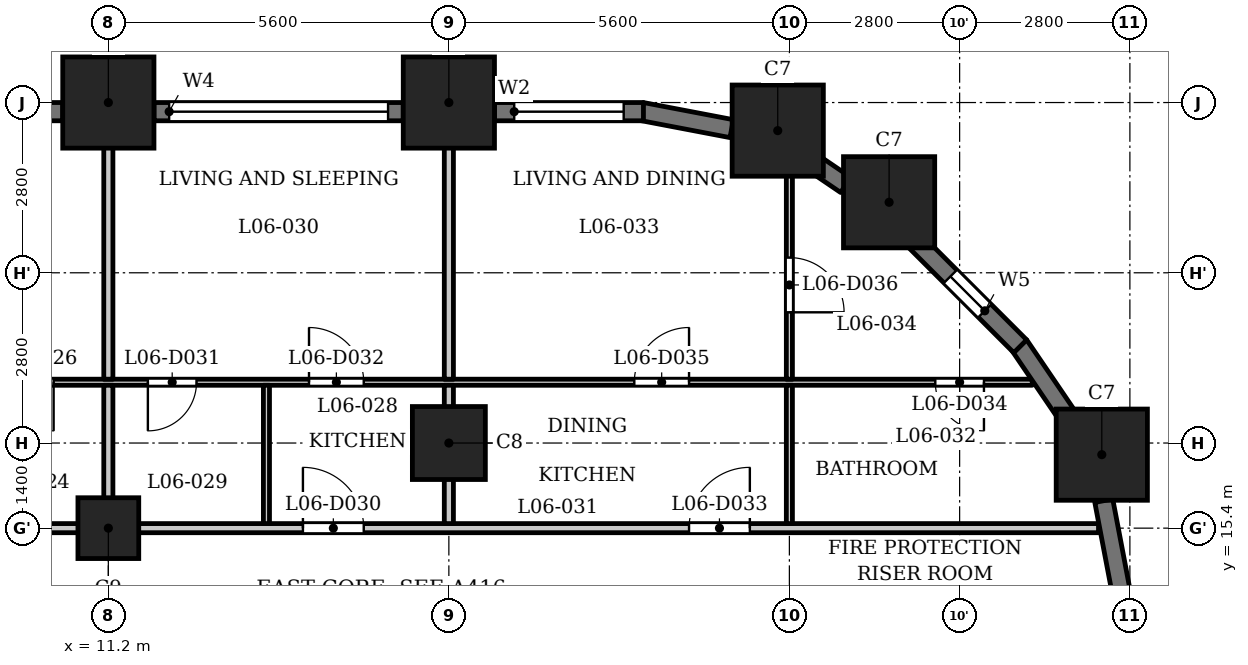
"""IFC4 building model, lengths in metres.
Left out: names, types, materials, properties, quantities, classifications, styles, units other than length and angle.
Written with IfcOpenShell. Run it as: python <this file> out.ifc"""

import sys

from ifc_helpers import new_model, si_unit, direction, frame, frame_2d, origin, origin_2d, place, context, subcontext, project, spatial, rectangle, extrude, element, fill, save


model = new_model("IFC4")
c1 = context("Model", 3, precision=1e-05, world=origin(), true_north=direction((0.0, 1.0)))
c2 = subcontext(c1, "Body", "Model", "MODEL_VIEW")
j1 = project(units=[si_unit("LENGTHUNIT", "METRE"), si_unit("PLANEANGLEUNIT", "RADIAN")], contexts=[c1])
p1 = place(None, origin())
s1 = spatial("IfcSite", under=j1, at=p1, CompositionType="ELEMENT")
p2 = place(p1, origin())
s2 = spatial("IfcBuilding", under=s1, at=p2, CompositionType="ELEMENT")
p3 = place(p2, frame((0.0, 0.0, 30.5)))
s3 = spatial("IfcBuildingStorey", under=s2, at=p3, CompositionType="ELEMENT", Elevation=30.5)
for number, where, z_axis, x_axis in (
    (1, (27.538, 16.609, 0.0), (0.0, 0.0, 1.0), (1.0, 0.0, 0.0)),
    (2, (24.04, 20.76, 0.0), (0.0, 0.0, 1.0), (1.0, 0.0, 0.0)),
    (3, (22.209, 21.938, 0.0), (0.0, 0.0, 1.0), (1.0, 0.0, 0.0)),
    (4, (16.8, 22.4, 0.0), (0.0, 0.0, 1.0), (1.0, 0.0, 0.0)),
    (5, (11.2, 22.4, 0.0), (0.0, 0.0, 1.0), (1.0, 0.0, 0.0)),
):
    element("IfcColumn", number, at=place(p3, frame(where, z_axis=z_axis, x_axis=x_axis)), inside=s3, PredefinedType="COLUMN", context=c2, shape_type="SweptSolid", body=[
        extrude(rectangle(XDim=1.5, YDim=1.5, at=origin_2d()), origin(), (0.0, 0.0, 1.0), 3.5),
    ])
p4 = place(p3, frame((16.8, 16.8, 0.0), z_axis=(0.0, 0.0, 1.0), x_axis=(1.0, 0.0, 0.0)))
e6 = element("IfcColumn", 6, at=p4, inside=s3, PredefinedType="COLUMN", context=c2, shape_type="SweptSolid", body=[
    extrude(rectangle(XDim=1.2, YDim=1.2, at=origin_2d()), origin(), (0.0, 0.0, 1.0), 3.5),
])
p5 = place(p3, frame((11.2, 15.4, 0.0), z_axis=(0.0, 0.0, 1.0), x_axis=(1.0, 0.0, 0.0)))
e7 = element("IfcColumn", 7, at=p5, inside=s3, PredefinedType="COLUMN", context=c2, shape_type="SweptSolid", body=[
    extrude(rectangle(XDim=1.0, YDim=1.0, at=origin_2d()), origin(), (0.0, 0.0, 1.0), 3.5),
])
for number, where, z_axis, x_axis in (
    (8, (27.853, 14.372, 0.0), (0.0, 0.0, 1.0), (-0.187, 0.982, 0.0)),
    (9, (27.025, 17.167, 0.0), (0.0, 0.0, 1.0), (-0.562, 0.827, 0.0)),
):
    element("IfcWall", number, at=place(p3, frame(where, z_axis=z_axis, x_axis=x_axis)), inside=s3, PredefinedType="SOLIDWALL", context=c2, shape_type="SweptSolid", body=[
        extrude(rectangle(XDim=1.506, YDim=0.3, at=frame_2d((0.753, 0.0))), origin(), (0.0, 0.0, 1.0), 2.35),
    ])
p6 = place(p3, frame((26.197, 18.391, 0.0), z_axis=(0.0, 0.0, 1.0), x_axis=(-0.707106781187, 0.707106781187, 0.0)))
e10 = element("IfcWall", 10, at=p6, inside=s3, PredefinedType="SOLIDWALL", context=c2, shape_type="SweptSolid", body=[
    extrude(rectangle(XDim=2.45, YDim=0.3, at=frame_2d((1.225, 0.0))), origin(), (0.0, 0.0, 1.0), 2.35),
])
p7 = place(p6, frame((0.825, 0.0, 0.6)))
e11 = element("IfcOpeningElement", 11, at=p7, cuts=e10, PredefinedType="OPENING", context=c2, shape_type="SweptSolid", body=[
    extrude(rectangle(XDim=0.8, YDim=1.55, at=frame_2d((0.4, 0.775))), frame((0.0, 0.16, 0.0), z_axis=(0.0, -1.0, 0.0), x_axis=(1.0, 0.0, 0.0)), (0.0, 0.0, 1.0), 0.32),
])
p8 = place(p3, frame((23.327, 21.045, 0.0), z_axis=(0.0, 0.0, 1.0), x_axis=(-0.827080706709, 0.562083182981, 0.0)))
e12 = element("IfcWall", 12, at=p8, inside=s3, PredefinedType="SOLIDWALL", context=c2, shape_type="SweptSolid", body=[
    extrude(rectangle(XDim=0.677, YDim=0.3, at=frame_2d((0.339, 0.0))), origin(), (0.0, 0.0, 1.0), 3.2),
])
p9 = place(p3, frame((21.451, 21.97, 0.0), z_axis=(0.0, 0.0, 1.0), x_axis=(-0.982287454367, 0.187380247071, 0.0)))
e13 = element("IfcWall", 13, at=p9, inside=s3, PredefinedType="SOLIDWALL", context=c2, shape_type="SweptSolid", body=[
    extrude(rectangle(XDim=1.506, YDim=0.3, at=frame_2d((0.753, 0.0))), origin(), (0.0, 0.0, 1.0), 2.35),
])
p10 = place(p3, frame((20.0, 22.25, 0.0), z_axis=(0.0, 0.0, 1.0), x_axis=(-1.0, 0.0, 0.0)))
e14 = element("IfcWall", 14, at=p10, inside=s3, PredefinedType="SOLIDWALL", context=c2, shape_type="SweptSolid", body=[
    extrude(rectangle(XDim=2.45, YDim=0.3, at=frame_2d((1.225, 0.0))), origin(), (0.0, 0.0, 1.0), 2.35),
])
p11 = place(p10, frame((0.325, 0.0, 0.9)))
e15 = element("IfcOpeningElement", 15, at=p11, cuts=e14, PredefinedType="OPENING", context=c2, shape_type="SweptSolid", body=[
    extrude(rectangle(XDim=1.8, YDim=1.25, at=frame_2d((0.9, 0.625))), frame((0.0, 0.16, 0.0), z_axis=(0.0, -1.0, 0.0), x_axis=(1.0, 0.0, 0.0)), (0.0, 0.0, 1.0), 0.32),
])
p12 = place(p3, frame((16.05, 22.25, 0.0), z_axis=(0.0, 0.0, 1.0), x_axis=(-1.0, 0.0, 0.0)))
e16 = element("IfcWall", 16, at=p12, inside=s3, PredefinedType="SOLIDWALL", context=c2, shape_type="SweptSolid", body=[
    extrude(rectangle(XDim=4.1, YDim=0.3, at=frame_2d((2.05, 0.0))), origin(), (0.0, 0.0, 1.0), 2.35),
])
p13 = place(p12, frame((0.25, 0.0, 1.2)))
e17 = element("IfcOpeningElement", 17, at=p13, cuts=e16, PredefinedType="OPENING", context=c2, shape_type="SweptSolid", body=[
    extrude(rectangle(XDim=3.6, YDim=0.95, at=frame_2d((1.8, 0.475))), frame((0.0, 0.16, 0.0), z_axis=(0.0, -1.0, 0.0), x_axis=(1.0, 0.0, 0.0)), (0.0, 0.0, 1.0), 0.32),
])
p14 = place(p3, frame((10.45, 22.25, 0.0), z_axis=(0.0, 0.0, 1.0), x_axis=(-1.0, 0.0, 0.0)))
e18 = element("IfcWall", 18, at=p14, inside=s3, PredefinedType="SOLIDWALL", context=c2, shape_type="SweptSolid", body=[
    extrude(rectangle(XDim=4.1, YDim=0.3, at=frame_2d((2.05, 0.0))), origin(), (0.0, 0.0, 1.0), 2.35),
])
p15 = place(p14, frame((0.25, 0.0, 1.2)))
e19 = element("IfcOpeningElement", 19, at=p15, cuts=e18, PredefinedType="OPENING", context=c2, shape_type="SweptSolid", body=[
    extrude(rectangle(XDim=3.6, YDim=0.95, at=frame_2d((1.8, 0.475))), frame((0.0, 0.16, 0.0), z_axis=(0.0, -1.0, 0.0), x_axis=(1.0, 0.0, 0.0)), (0.0, 0.0, 1.0), 0.32),
])
p16 = place(p3, frame((-27.484, 15.4, 0.0), z_axis=(0.0, 0.0, 1.0), x_axis=(1.0, 0.0, 0.0)))
e20 = element("IfcWall", 20, at=p16, inside=s3, PredefinedType="PARTITIONING", context=c2, shape_type="SweptSolid", body=[
    extrude(rectangle(XDim=54.968, YDim=0.15, at=frame_2d((27.484, 0.0))), origin(), (0.0, 0.0, 1.0), 3.2),
])
p17 = place(p16, frame((8.784, 0.0, 0.0)))
e21 = element("IfcOpeningElement", 21, at=p17, cuts=e20, PredefinedType="OPENING", context=c2, shape_type="SweptSolid", body=[
    extrude(rectangle(XDim=1.0, YDim=2.1, at=frame_2d((0.5, 1.05))), frame((0.0, 0.085, 0.0), z_axis=(0.0, -1.0, 0.0), x_axis=(1.0, 0.0, 0.0)), (0.0, 0.0, 1.0), 0.17),
])
p18 = place(p16, frame((14.634, 0.0, 0.0)))
e22 = element("IfcOpeningElement", 22, at=p18, cuts=e20, PredefinedType="OPENING", context=c2, shape_type="SweptSolid", body=[
    extrude(rectangle(XDim=1.0, YDim=2.1, at=frame_2d((0.5, 1.05))), frame((0.0, 0.085, 0.0), z_axis=(0.0, -1.0, 0.0), x_axis=(1.0, 0.0, 0.0)), (0.0, 0.0, 1.0), 0.17),
])
p19 = place(p16, frame((23.834, 0.0, 0.0)))
e23 = element("IfcOpeningElement", 23, at=p19, cuts=e20, PredefinedType="OPENING", context=c2, shape_type="SweptSolid", body=[
    extrude(rectangle(XDim=1.0, YDim=2.1, at=frame_2d((0.5, 1.05))), frame((0.0, 0.085, 0.0), z_axis=(0.0, -1.0, 0.0), x_axis=(1.0, 0.0, 0.0)), (0.0, 0.0, 1.0), 0.17),
])
p20 = place(p16, frame((28.184, 0.0, 0.0)))
e24 = element("IfcOpeningElement", 24, at=p20, cuts=e20, PredefinedType="OPENING", context=c2, shape_type="SweptSolid", body=[
    extrude(rectangle(XDim=1.0, YDim=2.1, at=frame_2d((0.5, 1.05))), frame((0.0, 0.085, 0.0), z_axis=(0.0, -1.0, 0.0), x_axis=(1.0, 0.0, 0.0)), (0.0, 0.0, 1.0), 0.17),
])
p21 = place(p16, frame((41.884, 0.0, 0.0)))
e25 = element("IfcOpeningElement", 25, at=p21, cuts=e20, PredefinedType="OPENING", context=c2, shape_type="SweptSolid", body=[
    extrude(rectangle(XDim=1.0, YDim=2.1, at=frame_2d((0.5, 1.05))), frame((0.0, 0.085, 0.0), z_axis=(0.0, -1.0, 0.0), x_axis=(1.0, 0.0, 0.0)), (0.0, 0.0, 1.0), 0.17),
])
p22 = place(p16, frame((48.234, 0.0, 0.0)))
e26 = element("IfcOpeningElement", 26, at=p22, cuts=e20, PredefinedType="OPENING", context=c2, shape_type="SweptSolid", body=[
    extrude(rectangle(XDim=1.0, YDim=2.1, at=frame_2d((0.5, 1.05))), frame((0.0, 0.085, 0.0), z_axis=(0.0, -1.0, 0.0), x_axis=(1.0, 0.0, 0.0)), (0.0, 0.0, 1.0), 0.17),
])
p23 = place(p3, frame((-26.732, 17.8, 0.0), z_axis=(0.0, 0.0, 1.0), x_axis=(1.0, 0.0, 0.0)))
e27 = element("IfcWall", 27, at=p23, inside=s3, PredefinedType="PARTITIONING", context=c2, shape_type="SweptSolid", body=[
    extrude(rectangle(XDim=53.126, YDim=0.1, at=frame_2d((26.563, 0.0))), origin(), (0.0, 0.0, 1.0), 3.2),
])
p24 = place(p23, frame((2.964, 0.0, 0.0)))
e28 = element("IfcOpeningElement", 28, at=p24, cuts=e27, PredefinedType="OPENING", context=c2, shape_type="SweptSolid", body=[
    extrude(rectangle(XDim=0.8, YDim=2.1, at=frame_2d((0.4, 1.05))), frame((0.0, 0.06, 0.0), z_axis=(0.0, -1.0, 0.0), x_axis=(1.0, 0.0, 0.0)), (0.0, 0.0, 1.0), 0.12),
])
p25 = place(p23, frame((7.132, 0.0, 0.0)))
e29 = element("IfcOpeningElement", 29, at=p25, cuts=e27, PredefinedType="OPENING", context=c2, shape_type="SweptSolid", body=[
    extrude(rectangle(XDim=0.9, YDim=2.1, at=frame_2d((0.45, 1.05))), frame((0.0, 0.06, 0.0), z_axis=(0.0, -1.0, 0.0), x_axis=(1.0, 0.0, 0.0)), (0.0, 0.0, 1.0), 0.12),
])
p26 = place(p23, frame((19.432, 0.0, 0.0)))
e30 = element("IfcOpeningElement", 30, at=p26, cuts=e27, PredefinedType="OPENING", context=c2, shape_type="SweptSolid", body=[
    extrude(rectangle(XDim=0.8, YDim=2.1, at=frame_2d((0.4, 1.05))), frame((0.0, 0.06, 0.0), z_axis=(0.0, -1.0, 0.0), x_axis=(1.0, 0.0, 0.0)), (0.0, 0.0, 1.0), 0.12),
])
p27 = place(p23, frame((16.732, 0.0, 0.0)))
e31 = element("IfcOpeningElement", 31, at=p27, cuts=e27, PredefinedType="OPENING", context=c2, shape_type="SweptSolid", body=[
    extrude(rectangle(XDim=0.9, YDim=2.1, at=frame_2d((0.45, 1.05))), frame((0.0, 0.06, 0.0), z_axis=(0.0, -1.0, 0.0), x_axis=(1.0, 0.0, 0.0)), (0.0, 0.0, 1.0), 0.12),
])
p28 = place(p23, frame((10.982, 0.0, 0.0)))
e32 = element("IfcOpeningElement", 32, at=p28, cuts=e27, PredefinedType="OPENING", context=c2, shape_type="SweptSolid", body=[
    extrude(rectangle(XDim=0.9, YDim=2.1, at=frame_2d((0.45, 1.05))), frame((0.0, 0.06, 0.0), z_axis=(0.0, -1.0, 0.0), x_axis=(1.0, 0.0, 0.0)), (0.0, 0.0, 1.0), 0.12),
])
p29 = place(p23, frame((12.982, 0.0, 0.0)))
e33 = element("IfcOpeningElement", 33, at=p29, cuts=e27, PredefinedType="OPENING", context=c2, shape_type="SweptSolid", body=[
    extrude(rectangle(XDim=0.9, YDim=2.1, at=frame_2d((0.45, 1.05))), frame((0.0, 0.06, 0.0), z_axis=(0.0, -1.0, 0.0), x_axis=(1.0, 0.0, 0.0)), (0.0, 0.0, 1.0), 0.12),
])
p30 = place(p23, frame((25.382, 0.0, 0.0)))
e34 = element("IfcOpeningElement", 34, at=p30, cuts=e27, PredefinedType="OPENING", context=c2, shape_type="SweptSolid", body=[
    extrude(rectangle(XDim=0.8, YDim=2.1, at=frame_2d((0.4, 1.05))), frame((0.0, 0.06, 0.0), z_axis=(0.0, -1.0, 0.0), x_axis=(1.0, 0.0, 0.0)), (0.0, 0.0, 1.0), 0.12),
])
p31 = place(p23, frame((22.182, 0.0, 0.0)))
e35 = element("IfcOpeningElement", 35, at=p31, cuts=e27, PredefinedType="OPENING", context=c2, shape_type="SweptSolid", body=[
    extrude(rectangle(XDim=0.9, YDim=2.1, at=frame_2d((0.45, 1.05))), frame((0.0, 0.06, 0.0), z_axis=(0.0, -1.0, 0.0), x_axis=(1.0, 0.0, 0.0)), (0.0, 0.0, 1.0), 0.12),
])
p32 = place(p23, frame((36.232, 0.0, 0.0)))
e36 = element("IfcOpeningElement", 36, at=p32, cuts=e27, PredefinedType="OPENING", context=c2, shape_type="SweptSolid", body=[
    extrude(rectangle(XDim=0.8, YDim=2.1, at=frame_2d((0.4, 1.05))), frame((0.0, 0.06, 0.0), z_axis=(0.0, -1.0, 0.0), x_axis=(1.0, 0.0, 0.0)), (0.0, 0.0, 1.0), 0.12),
])
p33 = place(p23, frame((33.782, 0.0, 0.0)))
e37 = element("IfcOpeningElement", 37, at=p33, cuts=e27, PredefinedType="OPENING", context=c2, shape_type="SweptSolid", body=[
    extrude(rectangle(XDim=0.9, YDim=2.1, at=frame_2d((0.45, 1.05))), frame((0.0, 0.06, 0.0), z_axis=(0.0, -1.0, 0.0), x_axis=(1.0, 0.0, 0.0)), (0.0, 0.0, 1.0), 0.12),
])
p34 = place(p23, frame((27.282, 0.0, 0.0)))
e38 = element("IfcOpeningElement", 38, at=p34, cuts=e27, PredefinedType="OPENING", context=c2, shape_type="SweptSolid", body=[
    extrude(rectangle(XDim=0.9, YDim=2.1, at=frame_2d((0.45, 1.05))), frame((0.0, 0.06, 0.0), z_axis=(0.0, -1.0, 0.0), x_axis=(1.0, 0.0, 0.0)), (0.0, 0.0, 1.0), 0.12),
])
p35 = place(p23, frame((30.282, 0.0, 0.0)))
e39 = element("IfcOpeningElement", 39, at=p35, cuts=e27, PredefinedType="OPENING", context=c2, shape_type="SweptSolid", body=[
    extrude(rectangle(XDim=0.9, YDim=2.1, at=frame_2d((0.45, 1.05))), frame((0.0, 0.06, 0.0), z_axis=(0.0, -1.0, 0.0), x_axis=(1.0, 0.0, 0.0)), (0.0, 0.0, 1.0), 0.12),
])
p36 = place(p23, frame((38.582, 0.0, 0.0)))
e40 = element("IfcOpeningElement", 40, at=p36, cuts=e27, PredefinedType="OPENING", context=c2, shape_type="SweptSolid", body=[
    extrude(rectangle(XDim=0.8, YDim=2.1, at=frame_2d((0.4, 1.05))), frame((0.0, 0.06, 0.0), z_axis=(0.0, -1.0, 0.0), x_axis=(1.0, 0.0, 0.0)), (0.0, 0.0, 1.0), 0.12),
])
p37 = place(p23, frame((41.232, 0.0, 0.0)))
e41 = element("IfcOpeningElement", 41, at=p37, cuts=e27, PredefinedType="OPENING", context=c2, shape_type="SweptSolid", body=[
    extrude(rectangle(XDim=0.9, YDim=2.1, at=frame_2d((0.45, 1.05))), frame((0.0, 0.06, 0.0), z_axis=(0.0, -1.0, 0.0), x_axis=(1.0, 0.0, 0.0)), (0.0, 0.0, 1.0), 0.12),
])
p38 = place(p23, frame((51.532, 0.0, 0.0)))
e42 = element("IfcOpeningElement", 42, at=p38, cuts=e27, PredefinedType="OPENING", context=c2, shape_type="SweptSolid", body=[
    extrude(rectangle(XDim=0.8, YDim=2.1, at=frame_2d((0.4, 1.05))), frame((0.0, 0.06, 0.0), z_axis=(0.0, -1.0, 0.0), x_axis=(1.0, 0.0, 0.0)), (0.0, 0.0, 1.0), 0.12),
])
p39 = place(p23, frame((46.582, 0.0, 0.0)))
e43 = element("IfcOpeningElement", 43, at=p39, cuts=e27, PredefinedType="OPENING", context=c2, shape_type="SweptSolid", body=[
    extrude(rectangle(XDim=0.9, YDim=2.1, at=frame_2d((0.45, 1.05))), frame((0.0, 0.06, 0.0), z_axis=(0.0, -1.0, 0.0), x_axis=(1.0, 0.0, 0.0)), (0.0, 0.0, 1.0), 0.12),
])
p40 = place(p3, frame((11.2, 15.475, 0.0), z_axis=(0.0, 0.0, 1.0), x_axis=(0.0, 1.0, 0.0)))
e44 = element("IfcWall", 44, at=p40, inside=s3, PredefinedType="PARTITIONING", context=c2, shape_type="SweptSolid", body=[
    extrude(rectangle(XDim=2.275, YDim=0.15, at=frame_2d((1.137, 0.0))), origin(), (0.0, 0.0, 1.0), 3.2),
])
p41 = place(p3, frame((11.2, 17.85, 0.0), z_axis=(0.0, 0.0, 1.0), x_axis=(0.0, 1.0, 0.0)))
e45 = element("IfcWall", 45, at=p41, inside=s3, PredefinedType="PARTITIONING", context=c2, shape_type="SweptSolid", body=[
    extrude(rectangle(XDim=5.28, YDim=0.15, at=frame_2d((2.64, 0.0))), origin(), (0.0, 0.0, 1.0), 3.2),
])
p42 = place(p3, frame((13.8, 15.475, 0.0), z_axis=(0.0, 0.0, 1.0), x_axis=(0.0, 1.0, 0.0)))
e46 = element("IfcWall", 46, at=p42, inside=s3, PredefinedType="PARTITIONING", context=c2, shape_type="SweptSolid", body=[
    extrude(rectangle(XDim=2.275, YDim=0.1, at=frame_2d((1.137, 0.0))), origin(), (0.0, 0.0, 1.0), 3.2),
])
p43 = place(p3, frame((16.8, 15.475, 0.0), z_axis=(0.0, 0.0, 1.0), x_axis=(0.0, 1.0, 0.0)))
e47 = element("IfcWall", 47, at=p43, inside=s3, PredefinedType="PARTITIONING", context=c2, shape_type="SweptSolid", body=[
    extrude(rectangle(XDim=2.275, YDim=0.15, at=frame_2d((1.137, 0.0))), origin(), (0.0, 0.0, 1.0), 3.2),
])
p44 = place(p3, frame((16.8, 17.85, 0.0), z_axis=(0.0, 0.0, 1.0), x_axis=(0.0, 1.0, 0.0)))
e48 = element("IfcWall", 48, at=p44, inside=s3, PredefinedType="PARTITIONING", context=c2, shape_type="SweptSolid", body=[
    extrude(rectangle(XDim=5.28, YDim=0.15, at=frame_2d((2.64, 0.0))), origin(), (0.0, 0.0, 1.0), 3.2),
])
p45 = place(p3, frame((22.4, 15.475, 0.0), z_axis=(0.0, 0.0, 1.0), x_axis=(0.0, 1.0, 0.0)))
e49 = element("IfcWall", 49, at=p45, inside=s3, PredefinedType="PARTITIONING", context=c2, shape_type="SweptSolid", body=[
    extrude(rectangle(XDim=2.275, YDim=0.1, at=frame_2d((1.137, 0.0))), origin(), (0.0, 0.0, 1.0), 3.2),
])
p46 = place(p3, frame((22.4, 17.85, 0.0), z_axis=(0.0, 0.0, 1.0), x_axis=(0.0, 1.0, 0.0)))
e50 = element("IfcWall", 50, at=p46, inside=s3, PredefinedType="PARTITIONING", context=c2, shape_type="SweptSolid", body=[
    extrude(rectangle(XDim=3.87, YDim=0.1, at=frame_2d((1.935, 0.0))), origin(), (0.0, 0.0, 1.0), 3.2),
])
p47 = place(p46, frame((1.1, 0.0, 0.0)))
e51 = element("IfcOpeningElement", 51, at=p47, cuts=e50, PredefinedType="OPENING", context=c2, shape_type="SweptSolid", body=[
    extrude(rectangle(XDim=0.9, YDim=2.1, at=frame_2d((0.45, 1.05))), frame((0.0, 0.06, 0.0), z_axis=(0.0, -1.0, 0.0), x_axis=(1.0, 0.0, 0.0)), (0.0, 0.0, 1.0), 0.12),
])
p48 = place(p32, origin())
e52 = element("IfcDoor", 52, at=p48, inside=s3, OperationType="SINGLE_SWING_RIGHT", PredefinedType="DOOR", context=c2, shape_type="SweptSolid", body=[
    extrude(rectangle(XDim=0.8, YDim=2.1, at=frame_2d((0.4, 1.05))), frame((0.0, 0.025, 0.0), z_axis=(0.0, -1.0, 0.0), x_axis=(1.0, 0.0, 0.0)), (0.0, 0.0, 1.0), 0.05),
])
fill(e36, e52)
p49 = place(p21, origin())
e53 = element("IfcDoor", 53, at=p49, inside=s3, OperationType="SINGLE_SWING_RIGHT", PredefinedType="DOOR", context=c2, shape_type="SweptSolid", body=[
    extrude(rectangle(XDim=1.0, YDim=2.1, at=frame_2d((0.5, 1.05))), frame((0.0, 0.025, 0.0), z_axis=(0.0, -1.0, 0.0), x_axis=(1.0, 0.0, 0.0)), (0.0, 0.0, 1.0), 0.05),
])
fill(e25, e53)
p50 = place(p36, origin())
e54 = element("IfcDoor", 54, at=p50, inside=s3, OperationType="SINGLE_SWING_LEFT", PredefinedType="DOOR", context=c2, shape_type="SweptSolid", body=[
    extrude(rectangle(XDim=0.8, YDim=2.1, at=frame_2d((0.4, 1.05))), frame((0.0, 0.025, 0.0), z_axis=(0.0, -1.0, 0.0), x_axis=(1.0, 0.0, 0.0)), (0.0, 0.0, 1.0), 0.05),
])
fill(e40, e54)
p51 = place(p37, origin())
e55 = element("IfcDoor", 55, at=p51, inside=s3, OperationType="SINGLE_SWING_RIGHT", PredefinedType="DOOR", context=c2, shape_type="SweptSolid", body=[
    extrude(rectangle(XDim=0.9, YDim=2.1, at=frame_2d((0.45, 1.05))), frame((0.0, 0.025, 0.0), z_axis=(0.0, -1.0, 0.0), x_axis=(1.0, 0.0, 0.0)), (0.0, 0.0, 1.0), 0.05),
])
fill(e41, e55)
p52 = place(p22, origin())
e56 = element("IfcDoor", 56, at=p52, inside=s3, OperationType="SINGLE_SWING_LEFT", PredefinedType="DOOR", context=c2, shape_type="SweptSolid", body=[
    extrude(rectangle(XDim=1.0, YDim=2.1, at=frame_2d((0.5, 1.05))), frame((0.0, 0.025, 0.0), z_axis=(0.0, -1.0, 0.0), x_axis=(1.0, 0.0, 0.0)), (0.0, 0.0, 1.0), 0.05),
])
fill(e26, e56)
p53 = place(p38, origin())
e57 = element("IfcDoor", 57, at=p53, inside=s3, OperationType="SINGLE_SWING_RIGHT", PredefinedType="DOOR", context=c2, shape_type="SweptSolid", body=[
    extrude(rectangle(XDim=0.8, YDim=2.1, at=frame_2d((0.4, 1.05))), frame((0.0, 0.025, 0.0), z_axis=(0.0, -1.0, 0.0), x_axis=(1.0, 0.0, 0.0)), (0.0, 0.0, 1.0), 0.05),
])
fill(e42, e57)
p54 = place(p39, origin())
e58 = element("IfcDoor", 58, at=p54, inside=s3, OperationType="SINGLE_SWING_LEFT", PredefinedType="DOOR", context=c2, shape_type="SweptSolid", body=[
    extrude(rectangle(XDim=0.9, YDim=2.1, at=frame_2d((0.45, 1.05))), frame((0.0, 0.025, 0.0), z_axis=(0.0, -1.0, 0.0), x_axis=(1.0, 0.0, 0.0)), (0.0, 0.0, 1.0), 0.05),
])
fill(e43, e58)
p55 = place(p47, origin())
e59 = element("IfcDoor", 59, at=p55, inside=s3, OperationType="SINGLE_SWING_LEFT", PredefinedType="DOOR", context=c2, shape_type="SweptSolid", body=[
    extrude(rectangle(XDim=0.9, YDim=2.1, at=frame_2d((0.45, 1.05))), frame((0.0, 0.025, 0.0), z_axis=(0.0, -1.0, 0.0), x_axis=(1.0, 0.0, 0.0)), (0.0, 0.0, 1.0), 0.05),
])
fill(e51, e59)
p56 = place(p7, origin())
e60 = element("IfcWindow", 60, at=p56, inside=s3, PartitioningType="SINGLE_PANEL", PredefinedType="WINDOW", context=c2, shape_type="SweptSolid", body=[
    extrude(rectangle(XDim=0.8, YDim=1.55, at=frame_2d((0.4, 0.775))), frame((0.0, 0.03, 0.0), z_axis=(0.0, -1.0, 0.0), x_axis=(1.0, 0.0, 0.0)), (0.0, 0.0, 1.0), 0.06),
])
fill(e11, e60)
p57 = place(p11, origin())
e61 = element("IfcWindow", 61, at=p57, inside=s3, PartitioningType="SINGLE_PANEL", PredefinedType="WINDOW", context=c2, shape_type="SweptSolid", body=[
    extrude(rectangle(XDim=1.8, YDim=1.25, at=frame_2d((0.9, 0.625))), frame((0.0, 0.03, 0.0), z_axis=(0.0, -1.0, 0.0), x_axis=(1.0, 0.0, 0.0)), (0.0, 0.0, 1.0), 0.06),
])
fill(e15, e61)
p58 = place(p13, origin())
e62 = element("IfcWindow", 62, at=p58, inside=s3, PartitioningType="SINGLE_PANEL", PredefinedType="WINDOW", context=c2, shape_type="SweptSolid", body=[
    extrude(rectangle(XDim=3.6, YDim=0.95, at=frame_2d((1.8, 0.475))), frame((0.0, 0.03, 0.0), z_axis=(0.0, -1.0, 0.0), x_axis=(1.0, 0.0, 0.0)), (0.0, 0.0, 1.0), 0.06),
])
fill(e17, e62)
save(model, sys.argv[1])
